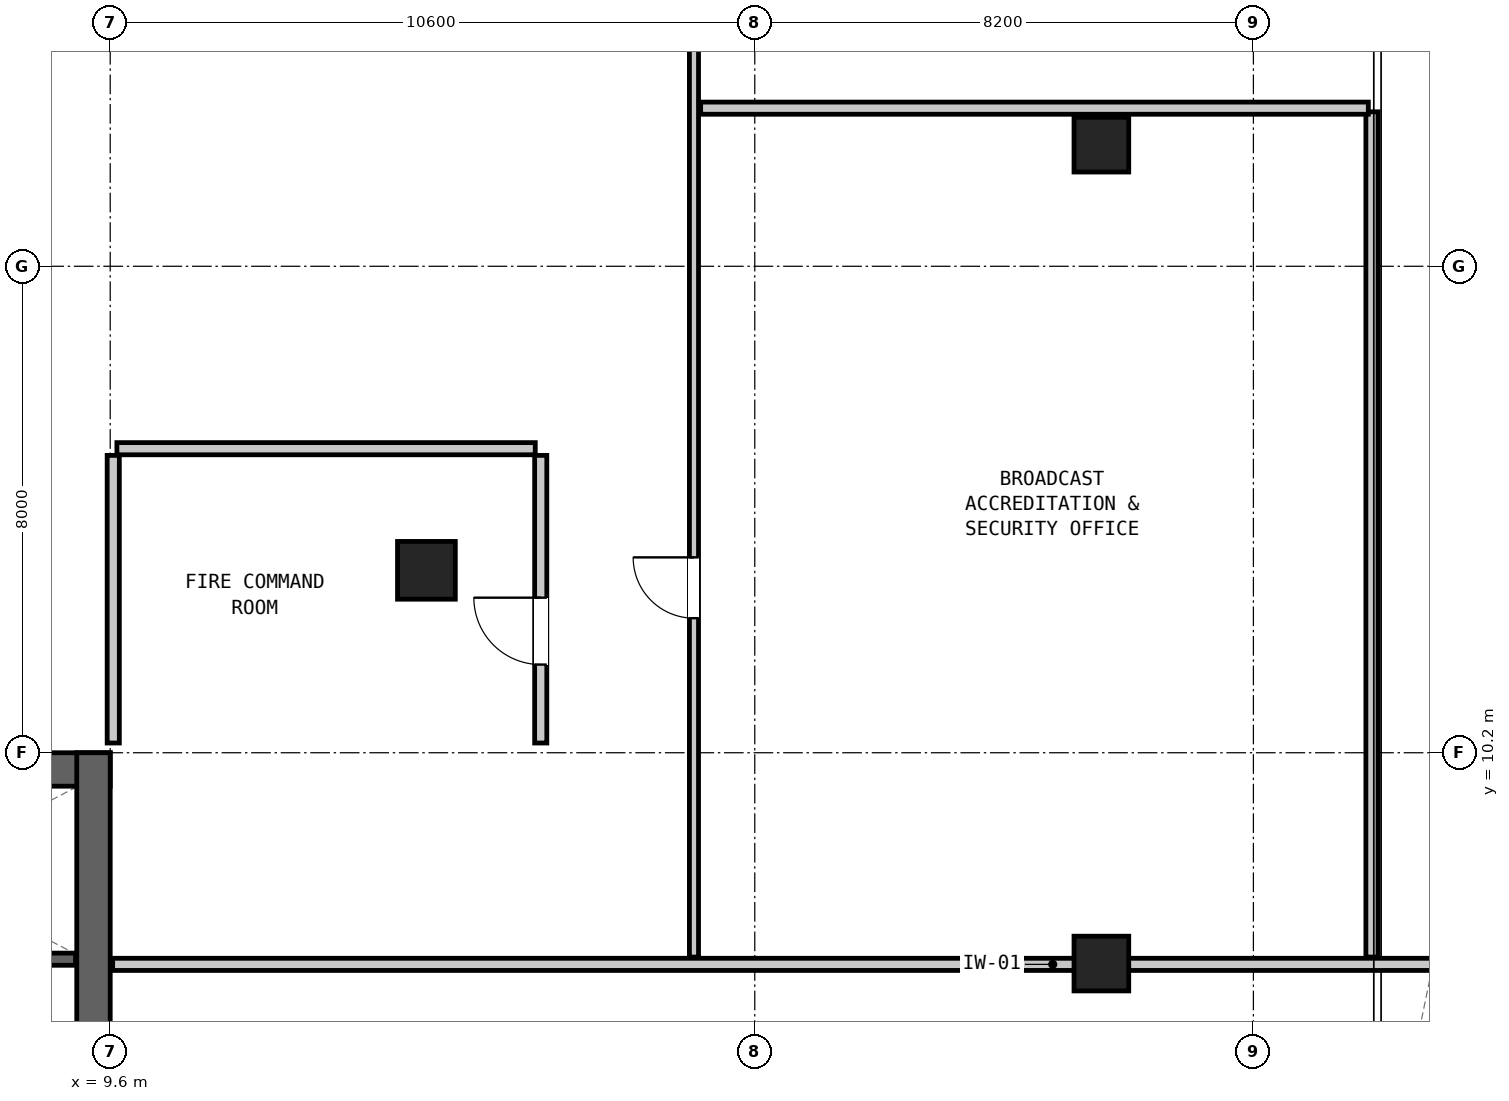
"""IFC4 building model, lengths in metres.
Left out: names, types, materials, properties, quantities, classifications, styles, units other than length and angle.
Written with IfcOpenShell. Run it as: python <this file> out.ifc"""

import sys

from ifc_helpers import new_model, si_unit, direction, frame, frame_2d, origin, origin_2d, place, context, subcontext, project, spatial, rectangle, hollow_rectangle, extrude, element, fill, save


model = new_model("IFC4")
c1 = context("Model", 3, precision=1e-05, world=origin(), true_north=direction((0.0, 1.0)))
c2 = subcontext(c1, "Body", "Model", "MODEL_VIEW")
j1 = project(units=[si_unit("LENGTHUNIT", "METRE"), si_unit("PLANEANGLEUNIT", "RADIAN")], contexts=[c1])
p1 = place(None, origin())
s1 = spatial("IfcSite", under=j1, at=p1, CompositionType="ELEMENT")
p2 = place(p1, origin())
s2 = spatial("IfcBuilding", under=s1, at=p2, CompositionType="ELEMENT")
p3 = place(p2, origin())
s3 = spatial("IfcBuildingStorey", under=s2, at=p3, CompositionType="ELEMENT", Elevation=0.0)
p4 = place(p3, frame((-9.6, 9.925, 0.0), z_axis=(0.0, 0.0, 1.0), x_axis=(1.0, 0.0, 0.0)))
e1 = element("IfcWall", 1, at=p4, inside=s3, PredefinedType="SHEAR", context=c2, shape_type="SweptSolid", body=[
    extrude(rectangle(XDim=19.2, YDim=0.55, at=frame_2d((9.6, 0.0))), origin(), (0.0, 0.0, 1.0), 5.1),
])
p5 = place(p3, frame((9.325, 3.6, 0.0), z_axis=(0.0, 0.0, 1.0), x_axis=(0.0, 1.0, 0.0)))
e2 = element("IfcWall", 2, at=p5, inside=s3, PredefinedType="SHEAR", context=c2, shape_type="SweptSolid", body=[
    extrude(rectangle(XDim=6.6, YDim=0.55, at=frame_2d((3.3, 0.0))), origin(), (0.0, 0.0, 1.0), 5.1),
])
p6 = place(p5, frame((0.95, 0.0, 0.0)))
e3 = element("IfcOpeningElement", 3, at=p6, cuts=e2, PredefinedType="OPENING", context=c2, shape_type="SweptSolid", body=[
    extrude(rectangle(XDim=1.1, YDim=2.08, at=frame_2d((0.55, 1.04))), frame((0.0, 0.287, 0.0), z_axis=(0.0, -1.0, 0.0), x_axis=(1.0, 0.0, 0.0)), (0.0, 0.0, 1.0), 0.574),
])
p7 = place(p3, frame((14.8, 13.2, 0.0), z_axis=(0.0, 0.0, 1.0), x_axis=(1.0, 0.0, 0.0)))
e4 = element("IfcColumn", 4, at=p7, inside=s3, PredefinedType="COLUMN", context=c2, shape_type="SweptSolid", body=[
    extrude(hollow_rectangle(XDim=0.95, YDim=0.95, WallThickness=0.06, at=origin_2d()), origin(), (0.0, 0.0, 1.0), 5.1),
])
for number, where, z_axis, x_axis in (
    (5, (25.9, 6.733, 0.0), (0.0, 0.0, 1.0), (0.0, 1.0, 0.0)),
    (6, (25.9, 20.2, 0.0), (0.0, 0.0, 1.0), (0.0, 1.0, 0.0)),
):
    element("IfcColumn", number, at=place(p3, frame(where, z_axis=z_axis, x_axis=x_axis)), inside=s3, PredefinedType="COLUMN", context=c2, shape_type="SweptSolid", body=[
        extrude(hollow_rectangle(XDim=0.9, YDim=0.9, WallThickness=0.055, at=origin_2d()), origin(), (0.0, 0.0, 1.0), 5.1),
    ])
p8 = place(p3, frame((2.36, 6.805, 0.0), z_axis=(0.0, 0.0, 1.0), x_axis=(1.0, 0.0, 0.0)))
e7 = element("IfcWall", 7, at=p8, inside=s3, PredefinedType="SHEAR", context=c2, shape_type="SweptSolid", body=[
    extrude(rectangle(XDim=6.67, YDim=0.2, at=frame_2d((3.335, 0.0))), origin(), (0.0, 0.0, 1.0), 4.78),
])
p9 = place(p8, frame((0.3, 0.0, 0.0)))
e8 = element("IfcOpeningElement", 8, at=p9, cuts=e7, PredefinedType="OPENING", context=c2, shape_type="SweptSolid", body=[
    extrude(rectangle(XDim=1.05, YDim=2.08, at=frame_2d((0.525, 1.04))), frame((0.0, 0.112, 0.0), z_axis=(0.0, -1.0, 0.0), x_axis=(1.0, 0.0, 0.0)), (0.0, 0.0, 1.0), 0.224),
])
p10 = place(p3, frame((9.64, 6.72, 0.0), z_axis=(0.0, 0.0, 1.0), x_axis=(1.0, 0.0, 0.0)))
e9 = element("IfcWall", 9, at=p10, inside=s3, PredefinedType="PARTITIONING", context=c2, shape_type="SweptSolid", body=[
    extrude(rectangle(XDim=30.92, YDim=0.2, at=frame_2d((15.46, 0.0))), origin(), (0.0, 0.0, 1.0), 4.78),
])
p11 = place(p3, frame((9.71, 15.2, 0.0), z_axis=(0.0, 0.0, 1.0), x_axis=(1.0, 0.0, 0.0)))
e10 = element("IfcWall", 10, at=p11, inside=s3, PredefinedType="PARTITIONING", context=c2, shape_type="SweptSolid", body=[
    extrude(rectangle(XDim=6.88, YDim=0.2, at=frame_2d((3.44, 0.0))), origin(), (0.0, 0.0, 1.0), 4.78),
])
p12 = place(p3, frame((9.65, 10.36, 0.0), z_axis=(0.0, 0.0, 1.0), x_axis=(0.0, 1.0, 0.0)))
e11 = element("IfcWall", 11, at=p12, inside=s3, PredefinedType="PARTITIONING", context=c2, shape_type="SweptSolid", body=[
    extrude(rectangle(XDim=4.73, YDim=0.2, at=frame_2d((2.365, 0.0))), origin(), (0.0, 0.0, 1.0), 4.78),
])
p13 = place(p3, frame((16.68, 10.36, 0.0), z_axis=(0.0, 0.0, 1.0), x_axis=(0.0, 1.0, 0.0)))
e12 = element("IfcWall", 12, at=p13, inside=s3, PredefinedType="PARTITIONING", context=c2, shape_type="SweptSolid", body=[
    extrude(rectangle(XDim=4.73, YDim=0.2, at=frame_2d((2.365, 0.0))), origin(), (0.0, 0.0, 1.0), 4.78),
])
p14 = place(p13, frame((1.29, 0.0, 0.0)))
e13 = element("IfcOpeningElement", 13, at=p14, cuts=e12, PredefinedType="OPENING", context=c2, shape_type="SweptSolid", body=[
    extrude(rectangle(XDim=1.1, YDim=2.08, at=frame_2d((0.55, 1.04))), frame((0.0, 0.112, 0.0), z_axis=(0.0, -1.0, 0.0), x_axis=(1.0, 0.0, 0.0)), (0.0, 0.0, 1.0), 0.224),
])
p15 = place(p3, frame((19.2, 6.84, 0.0), z_axis=(0.0, 0.0, 1.0), x_axis=(0.0, 1.0, 0.0)))
e14 = element("IfcWall", 14, at=p15, inside=s3, PredefinedType="PARTITIONING", context=c2, shape_type="SweptSolid", body=[
    extrude(rectangle(XDim=18.9, YDim=0.15, at=frame_2d((9.45, 0.0))), origin(), (0.0, 0.0, 1.0), 4.78),
])
p16 = place(p15, frame((5.573, 0.0, 0.0)))
e15 = element("IfcOpeningElement", 15, at=p16, cuts=e14, PredefinedType="OPENING", context=c2, shape_type="SweptSolid", body=[
    extrude(rectangle(XDim=1.0, YDim=2.06, at=frame_2d((0.5, 1.03))), frame((0.0, 0.087, 0.0), z_axis=(0.0, -1.0, 0.0), x_axis=(1.0, 0.0, 0.0)), (0.0, 0.0, 1.0), 0.174),
])
p17 = place(p3, frame((30.35, 6.84, 0.0), z_axis=(0.0, 0.0, 1.0), x_axis=(0.0, 1.0, 0.0)))
e16 = element("IfcWall", 16, at=p17, inside=s3, PredefinedType="PARTITIONING", context=c2, shape_type="SweptSolid", body=[
    extrude(rectangle(XDim=13.9, YDim=0.2, at=frame_2d((6.95, 0.0))), origin(), (0.0, 0.0, 1.0), 4.78),
])
p18 = place(p3, frame((19.31, 20.8, 0.0), z_axis=(0.0, 0.0, 1.0), x_axis=(1.0, 0.0, 0.0)))
e17 = element("IfcWall", 17, at=p18, inside=s3, PredefinedType="PARTITIONING", context=c2, shape_type="SweptSolid", body=[
    extrude(rectangle(XDim=10.98, YDim=0.2, at=frame_2d((5.49, 0.0))), origin(), (0.0, 0.0, 1.0), 4.78),
])
p19 = place(p14, origin())
e18 = element("IfcDoor", 18, at=p19, inside=s3, OperationType="SINGLE_SWING_RIGHT", PredefinedType="DOOR", context=c2, shape_type="SweptSolid", body=[
    extrude(rectangle(XDim=1.1, YDim=2.08, at=frame_2d((0.55, 1.04))), frame((0.0, 0.025, 0.0), z_axis=(0.0, -1.0, 0.0), x_axis=(1.0, 0.0, 0.0)), (0.0, 0.0, 1.0), 0.05),
])
fill(e13, e18)
p20 = place(p16, origin())
e19 = element("IfcDoor", 19, at=p20, inside=s3, OperationType="SINGLE_SWING_RIGHT", PredefinedType="DOOR", context=c2, shape_type="SweptSolid", body=[
    extrude(rectangle(XDim=1.0, YDim=2.06, at=frame_2d((0.5, 1.03))), frame((0.0, 0.025, 0.0), z_axis=(0.0, -1.0, 0.0), x_axis=(1.0, 0.0, 0.0)), (0.0, 0.0, 1.0), 0.05),
])
fill(e15, e19)
save(model, sys.argv[1])
